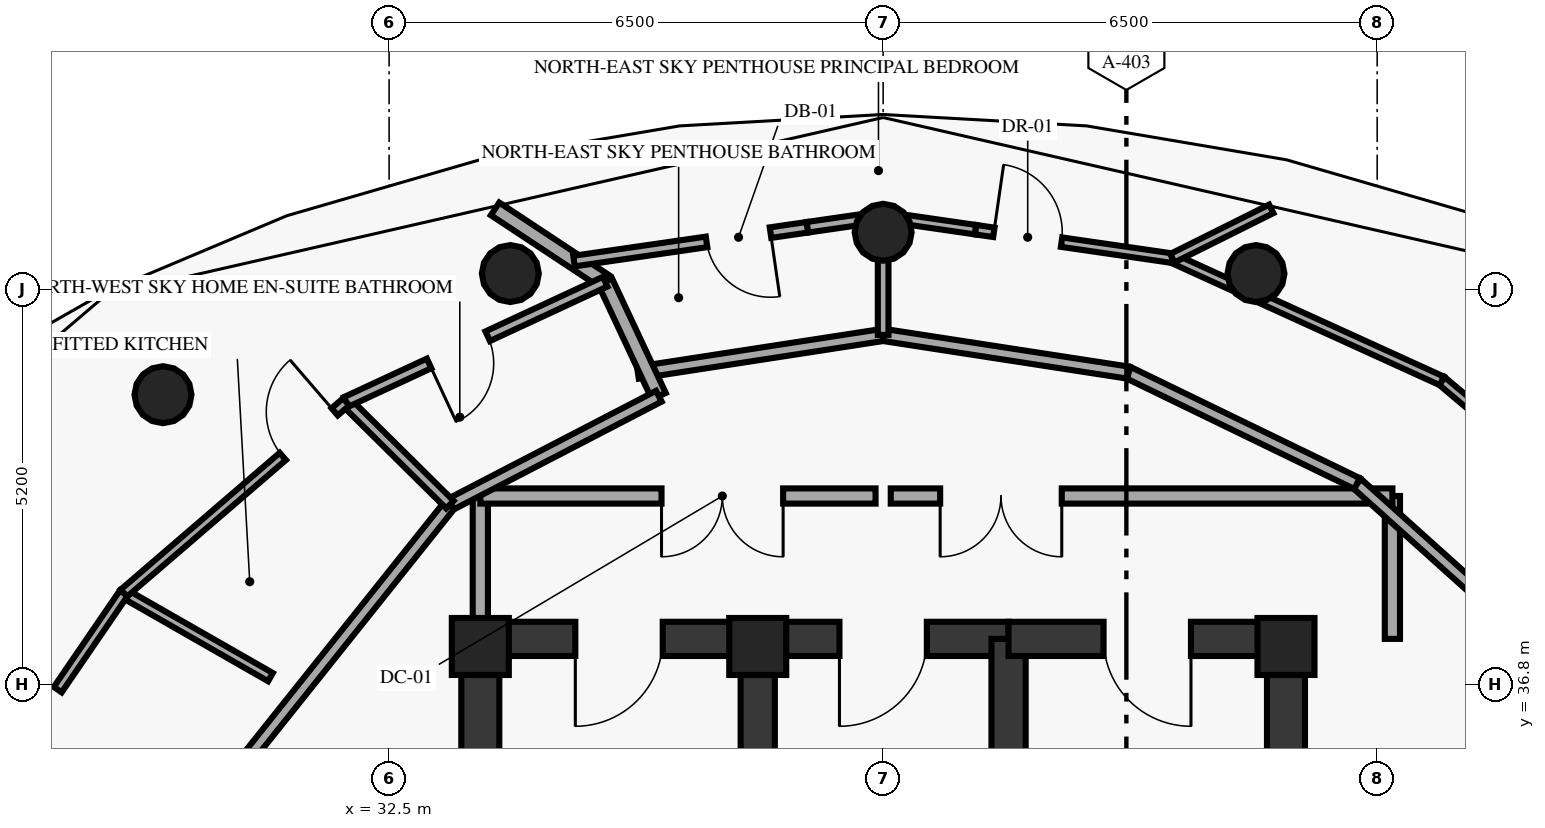
"""IFC4 building model, lengths in metres.
Left out: names, types, materials, properties, quantities, classifications, styles, units other than length and angle.
Written with IfcOpenShell. Run it as: python <this file> out.ifc"""

import sys

from ifc_helpers import new_model, si_unit, direction, frame, frame_2d, origin, origin_2d, place, context, subcontext, project, spatial, rectangle, circle, extrude, element, fill, save


model = new_model("IFC4")
c1 = context("Model", 3, precision=1e-05, world=origin(), true_north=direction((0.0, 1.0)))
c2 = subcontext(c1, "Body", "Model", "MODEL_VIEW")
j1 = project(units=[si_unit("LENGTHUNIT", "METRE"), si_unit("PLANEANGLEUNIT", "RADIAN")], contexts=[c1])
p1 = place(None, origin())
s1 = spatial("IfcSite", under=j1, at=p1, CompositionType="ELEMENT")
p2 = place(p1, origin())
s2 = spatial("IfcBuilding", under=s1, at=p2, CompositionType="ELEMENT")
p3 = place(p2, frame((0.0, 0.0, 255.6)))
s3 = spatial("IfcBuildingStorey", under=s2, at=p3, CompositionType="ELEMENT", Elevation=255.6)
for number, where, z_axis, x_axis in (
    (1, (44.3, 37.3, 0.0), (0.0, 0.0, 1.0), (1.0, 0.0, 0.0)),
    (2, (37.35, 37.3, 0.0), (0.0, 0.0, 1.0), (1.0, 0.0, 0.0)),
    (3, (33.7, 37.3, 0.0), (0.0, 0.0, 1.0), (1.0, 0.0, 0.0)),
):
    element("IfcColumn", number, at=place(p3, frame(where, z_axis=z_axis, x_axis=x_axis)), inside=s3, PredefinedType="PILASTER", context=c2, shape_type="SweptSolid", body=[
        extrude(rectangle(XDim=0.75, YDim=0.75, at=origin_2d()), origin(), (0.0, 0.0, 1.0), 3.54),
    ])
for number, where, z_axis, x_axis in (
    (4, (43.905, 42.207, 0.0), (0.0, 0.0, 1.0), (1.0, 0.0, 0.0)),
    (5, (39.0, 42.75, 0.0), (0.0, 0.0, 1.0), (1.0, 0.0, 0.0)),
    (6, (34.095, 42.207, 0.0), (0.0, 0.0, 1.0), (1.0, 0.0, 0.0)),
    (7, (29.525, 40.613, 0.0), (0.0, 0.0, 1.0), (1.0, 0.0, 0.0)),
):
    element("IfcColumn", number, at=place(p3, frame(where, z_axis=z_axis, x_axis=x_axis)), inside=s3, PredefinedType="COLUMN", context=c2, shape_type="SweptSolid", body=[
        extrude(circle(Radius=0.375, at=origin_2d()), origin(), (0.0, 0.0, 1.0), 3.54),
    ])
for number, where, z_axis, x_axis in (
    (8, (33.7, 29.05, 0.0), (0.0, 0.0, 1.0), (0.0, 1.0, 0.0)),
    (9, (44.3, 29.05, 0.0), (0.0, 0.0, 1.0), (0.0, 1.0, 0.0)),
):
    element("IfcWall", number, at=place(p3, frame(where, z_axis=z_axis, x_axis=x_axis)), inside=s3, PredefinedType="SHEAR", context=c2, shape_type="SweptSolid", body=[
        extrude(rectangle(XDim=8.35, YDim=0.5, at=frame_2d((4.175, 0.0))), origin(), (0.0, 0.0, 1.0), 3.54),
    ])
p4 = place(p3, frame((37.35, 37.4, 0.0), z_axis=(0.0, 0.0, 1.0), x_axis=(-1.0, 0.0, 0.0)))
e10 = element("IfcWall", 10, at=p4, inside=s3, PredefinedType="SHEAR", context=c2, shape_type="SweptSolid", body=[
    extrude(rectangle(XDim=3.65, YDim=0.45, at=frame_2d((1.825, 0.0))), origin(), (0.0, 0.0, 1.0), 3.54),
])
p5 = place(p4, frame((1.25, 0.0, 0.0)))
e11 = element("IfcOpeningElement", 11, at=p5, cuts=e10, PredefinedType="OPENING", context=c2, shape_type="SweptSolid", body=[
    extrude(rectangle(XDim=1.15, YDim=2.15, at=frame_2d((0.575, 1.075))), frame((0.0, 0.235, 0.0), z_axis=(0.0, -1.0, 0.0), x_axis=(1.0, 0.0, 0.0)), (0.0, 0.0, 1.0), 0.47),
])
p6 = place(p3, frame((37.35, 29.05, 0.0), z_axis=(0.0, 0.0, 1.0), x_axis=(0.0, 1.0, 0.0)))
e12 = element("IfcWall", 12, at=p6, inside=s3, PredefinedType="SHEAR", context=c2, shape_type="SweptSolid", body=[
    extrude(rectangle(XDim=8.35, YDim=0.45, at=frame_2d((4.175, 0.0))), origin(), (0.0, 0.0, 1.0), 3.54),
])
p7 = place(p3, frame((40.65, 37.4, 0.0), z_axis=(0.0, 0.0, 1.0), x_axis=(-1.0, 0.0, 0.0)))
e13 = element("IfcWall", 13, at=p7, inside=s3, PredefinedType="SHEAR", context=c2, shape_type="SweptSolid", body=[
    extrude(rectangle(XDim=3.3, YDim=0.45, at=frame_2d((1.65, 0.0))), origin(), (0.0, 0.0, 1.0), 3.54),
])
p8 = place(p7, frame((1.075, 0.0, 0.0)))
e14 = element("IfcOpeningElement", 14, at=p8, cuts=e13, PredefinedType="OPENING", context=c2, shape_type="SweptSolid", body=[
    extrude(rectangle(XDim=1.15, YDim=2.15, at=frame_2d((0.575, 1.075))), frame((0.0, 0.235, 0.0), z_axis=(0.0, -1.0, 0.0), x_axis=(1.0, 0.0, 0.0)), (0.0, 0.0, 1.0), 0.47),
])
p9 = place(p3, frame((40.65, 29.05, 0.0), z_axis=(0.0, 0.0, 1.0), x_axis=(0.0, 1.0, 0.0)))
e15 = element("IfcWall", 15, at=p9, inside=s3, PredefinedType="SHEAR", context=c2, shape_type="SweptSolid", body=[
    extrude(rectangle(XDim=8.35, YDim=0.45, at=frame_2d((4.175, 0.0))), origin(), (0.0, 0.0, 1.0), 3.54),
])
p10 = place(p3, frame((44.3, 37.4, 0.0), z_axis=(0.0, 0.0, 1.0), x_axis=(-1.0, 0.0, 0.0)))
e16 = element("IfcWall", 16, at=p10, inside=s3, PredefinedType="SHEAR", context=c2, shape_type="SweptSolid", body=[
    extrude(rectangle(XDim=3.65, YDim=0.45, at=frame_2d((1.825, 0.0))), origin(), (0.0, 0.0, 1.0), 3.54),
])
p11 = place(p10, frame((1.25, 0.0, 0.0)))
e17 = element("IfcOpeningElement", 17, at=p11, cuts=e16, PredefinedType="OPENING", context=c2, shape_type="SweptSolid", body=[
    extrude(rectangle(XDim=1.15, YDim=2.15, at=frame_2d((0.575, 1.075))), frame((0.0, 0.235, 0.0), z_axis=(0.0, -1.0, 0.0), x_axis=(1.0, 0.0, 0.0)), (0.0, 0.0, 1.0), 0.47),
])
for number, where, z_axis, x_axis in (
    (18, (33.7, 37.4, 0.0), (0.0, 0.0, 1.0), (0.0, 1.0, 0.0)),
    (19, (45.7, 37.4, 0.0), (0.0, 0.0, 1.0), (0.0, 1.0, 0.0)),
):
    element("IfcWall", number, at=place(p3, frame(where, z_axis=z_axis, x_axis=x_axis)), inside=s3, PredefinedType="SOLIDWALL", context=c2, shape_type="SweptSolid", body=[
        extrude(rectangle(XDim=1.88, YDim=0.2, at=frame_2d((0.94, 0.0))), origin(), (0.0, 0.0, 1.0), 3.54),
    ])
p12 = place(p3, frame((38.9, 39.28, 0.0), z_axis=(0.0, 0.0, 1.0), x_axis=(-1.0, 0.0, 0.0)))
e20 = element("IfcWall", 20, at=p12, inside=s3, PredefinedType="SOLIDWALL", context=c2, shape_type="SweptSolid", body=[
    extrude(rectangle(XDim=5.2, YDim=0.2, at=frame_2d((2.6, 0.0))), origin(), (0.0, 0.0, 1.0), 3.54),
])
p13 = place(p12, frame((1.216, 0.0, 0.0)))
e21 = element("IfcOpeningElement", 21, at=p13, cuts=e20, PredefinedType="OPENING", context=c2, shape_type="SweptSolid", body=[
    extrude(rectangle(XDim=1.6, YDim=2.2, at=frame_2d((0.8, 1.1))), frame((0.0, 0.11, 0.0), z_axis=(0.0, -1.0, 0.0), x_axis=(1.0, 0.0, 0.0)), (0.0, 0.0, 1.0), 0.22),
])
p14 = place(p3, frame((45.7, 39.28, 0.0), z_axis=(0.0, 0.0, 1.0), x_axis=(-1.0, 0.0, 0.0)))
e22 = element("IfcWall", 22, at=p14, inside=s3, PredefinedType="SOLIDWALL", context=c2, shape_type="SweptSolid", body=[
    extrude(rectangle(XDim=6.6, YDim=0.2, at=frame_2d((3.3, 0.0))), origin(), (0.0, 0.0, 1.0), 3.54),
])
p15 = place(p14, frame((4.35, 0.0, 0.0)))
e23 = element("IfcOpeningElement", 23, at=p15, cuts=e22, PredefinedType="OPENING", context=c2, shape_type="SweptSolid", body=[
    extrude(rectangle(XDim=1.6, YDim=2.2, at=frame_2d((0.8, 1.1))), frame((0.0, 0.11, 0.0), z_axis=(0.0, -1.0, 0.0), x_axis=(1.0, 0.0, 0.0)), (0.0, 0.0, 1.0), 0.22),
])
p16 = place(p3, frame((45.235, 39.444, 0.0), z_axis=(0.0, 0.0, 1.0), x_axis=(0.743958104357, -0.668226263299, 0.0)))
e24 = element("IfcWall", 24, at=p16, inside=s3, PredefinedType="PARTITIONING", context=c2, shape_type="SweptSolid", body=[
    extrude(rectangle(XDim=3.472, YDim=0.16, at=frame_2d((1.736, 0.0))), origin(), (0.0, 0.0, 1.0), 3.54),
])
p17 = place(p16, frame((2.272, 0.0, 0.0)))
e25 = element("IfcOpeningElement", 25, at=p17, cuts=e24, PredefinedType="OPENING", context=c2, shape_type="SweptSolid", body=[
    extrude(rectangle(XDim=1.0, YDim=2.15, at=frame_2d((0.5, 1.075))), frame((0.0, 0.09, 0.0), z_axis=(0.0, -1.0, 0.0), x_axis=(1.0, 0.0, 0.0)), (0.0, 0.0, 1.0), 0.18),
])
p18 = place(p3, frame((45.235, 39.444, 0.0), z_axis=(0.0, 0.0, 1.0), x_axis=(-0.899751550897, 0.436402505329, 0.0)))
e26 = element("IfcWall", 26, at=p18, inside=s3, PredefinedType="PARTITIONING", context=c2, shape_type="SweptSolid", body=[
    extrude(rectangle(XDim=3.343, YDim=0.16, at=frame_2d((1.672, 0.0))), origin(), (0.0, 0.0, 1.0), 3.54),
])
for number, where, z_axis, x_axis in (
    (27, (42.227, 40.903, 0.0), (0.0, 0.0, 1.0), (-0.988, 0.152, 0.0)),
    (28, (39.0, 41.4, 0.0), (0.0, 0.0, 1.0), (-0.988, -0.152, 0.0)),
):
    element("IfcWall", number, at=place(p3, frame(where, z_axis=z_axis, x_axis=x_axis)), inside=s3, PredefinedType="PARTITIONING", context=c2, shape_type="SweptSolid", body=[
        extrude(rectangle(XDim=3.265, YDim=0.16, at=frame_2d((1.633, 0.0))), origin(), (0.0, 0.0, 1.0), 3.54),
    ])
p19 = place(p3, frame((36.049, 40.593, 0.0), z_axis=(0.0, 0.0, 1.0), x_axis=(-0.424242188274, 0.905548764942, 0.0)))
e29 = element("IfcWall", 29, at=p19, inside=s3, PredefinedType="PARTITIONING", context=c2, shape_type="SweptSolid", body=[
    extrude(rectangle(XDim=1.664, YDim=0.2, at=frame_2d((0.832, 0.0))), origin(), (0.0, 0.0, 1.0), 3.54),
])
p20 = place(p3, frame((35.343, 42.1, 0.0), z_axis=(0.0, 0.0, 1.0), x_axis=(-0.834163281992, 0.551517559989, 0.0)))
e30 = element("IfcWall", 30, at=p20, inside=s3, PredefinedType="PARTITIONING", context=c2, shape_type="SweptSolid", body=[
    extrude(rectangle(XDim=1.737, YDim=0.2, at=frame_2d((0.869, 0.0))), origin(), (0.0, 0.0, 1.0), 3.54),
])
p21 = place(p3, frame((46.35, 40.795, 0.0), z_axis=(0.0, 0.0, 1.0), x_axis=(0.764348134159, -0.644803791713, 0.0)))
e31 = element("IfcWall", 31, at=p21, inside=s3, PredefinedType="PARTITIONING", context=c2, shape_type="SweptSolid", body=[
    extrude(rectangle(XDim=3.982, YDim=0.125, at=frame_2d((1.991, 0.0))), origin(), (0.0, 0.0, 1.0), 3.54),
])
p22 = place(p21, frame((2.63, 0.0, 0.0)))
e32 = element("IfcOpeningElement", 32, at=p22, cuts=e31, PredefinedType="OPENING", context=c2, shape_type="SweptSolid", body=[
    extrude(rectangle(XDim=0.9, YDim=2.1, at=frame_2d((0.45, 1.05))), frame((0.0, 0.073, 0.0), z_axis=(0.0, -1.0, 0.0), x_axis=(1.0, 0.0, 0.0)), (0.0, 0.0, 1.0), 0.145),
])
p23 = place(p3, frame((46.35, 40.795, 0.0), z_axis=(0.0, 0.0, 1.0), x_axis=(-0.910117326054, 0.414350639938, 0.0)))
e33 = element("IfcWall", 33, at=p23, inside=s3, PredefinedType="PARTITIONING", context=c2, shape_type="SweptSolid", body=[
    extrude(rectangle(XDim=3.895, YDim=0.125, at=frame_2d((1.948, 0.0))), origin(), (0.0, 0.0, 1.0), 3.54),
])
p24 = place(p3, frame((39.0, 42.96, 0.0), z_axis=(0.0, 0.0, 1.0), x_axis=(0.989701809114, -0.143144434177, 0.0)))
e34 = element("IfcWall", 34, at=p24, inside=s3, PredefinedType="PARTITIONING", context=c2, shape_type="SweptSolid", body=[
    extrude(rectangle(XDim=1.23, YDim=0.125, at=frame_2d((0.615, 0.0))), origin(), (0.0, 0.0, 1.0), 3.54),
])
p25 = place(p3, frame((40.217, 42.784, 0.0), z_axis=(0.0, 0.0, 1.0), x_axis=(0.989663671869, -0.143407867924, 0.0)))
e35 = element("IfcWall", 35, at=p25, inside=s3, PredefinedType="PARTITIONING", context=c2, shape_type="SweptSolid", body=[
    extrude(rectangle(XDim=2.615, YDim=0.125, at=frame_2d((1.308, 0.0))), origin(), (0.0, 0.0, 1.0), 3.0),
])
p26 = place(p25, frame((0.242, 0.0, 0.0)))
e36 = element("IfcOpeningElement", 36, at=p26, cuts=e35, PredefinedType="OPENING", context=c2, shape_type="SweptSolid", body=[
    extrude(rectangle(XDim=0.9, YDim=2.1, at=frame_2d((0.45, 1.05))), frame((0.0, 0.073, 0.0), z_axis=(0.0, -1.0, 0.0), x_axis=(1.0, 0.0, 0.0)), (0.0, 0.0, 1.0), 0.145),
])
p27 = place(p3, frame((34.933, 42.371, 0.0), z_axis=(0.0, 0.0, 1.0), x_axis=(0.98967063222, 0.143359826038, 0.0)))
e37 = element("IfcWall", 37, at=p27, inside=s3, PredefinedType="PARTITIONING", context=c2, shape_type="SweptSolid", body=[
    extrude(rectangle(XDim=3.103, YDim=0.14, at=frame_2d((1.551, 0.0))), origin(), (0.0, 0.0, 1.0), 3.0),
])
p28 = place(p27, frame((1.762, 0.0, 0.0)))
e38 = element("IfcOpeningElement", 38, at=p28, cuts=e37, PredefinedType="OPENING", context=c2, shape_type="SweptSolid", body=[
    extrude(rectangle(XDim=0.85, YDim=2.1, at=frame_2d((0.425, 1.05))), frame((0.0, 0.08, 0.0), z_axis=(0.0, -1.0, 0.0), x_axis=(1.0, 0.0, 0.0)), (0.0, 0.0, 1.0), 0.16),
])
p29 = place(p3, frame((38.004, 42.816, 0.0), z_axis=(0.0, 0.0, 1.0), x_axis=(0.989705462513, 0.143119172275, 0.0)))
e39 = element("IfcWall", 39, at=p29, inside=s3, PredefinedType="PARTITIONING", context=c2, shape_type="SweptSolid", body=[
    extrude(rectangle(XDim=1.006, YDim=0.14, at=frame_2d((0.503, 0.0))), origin(), (0.0, 0.0, 1.0), 3.54),
])
p30 = place(p3, frame((39.0, 41.4, 0.0), z_axis=(0.0, 0.0, 1.0), x_axis=(0.0, 1.0, 0.0)))
e40 = element("IfcWall", 40, at=p30, inside=s3, PredefinedType="PARTITIONING", context=c2, shape_type="SweptSolid", body=[
    extrude(rectangle(XDim=1.56, YDim=0.14, at=frame_2d((0.78, 0.0))), origin(), (0.0, 0.0, 1.0), 3.54),
])
p31 = place(p3, frame((42.805, 42.409, 0.0), z_axis=(0.0, 0.0, 1.0), x_axis=(0.894796289478, 0.446474635714, 0.0)))
e41 = element("IfcWall", 41, at=p31, inside=s3, PredefinedType="PARTITIONING", context=c2, shape_type="SweptSolid", body=[
    extrude(rectangle(XDim=1.454, YDim=0.125, at=frame_2d((0.727, 0.0))), origin(), (0.0, 0.0, 1.0), 3.54),
])
p32 = place(p3, frame((36.049, 40.593, 0.0), z_axis=(0.0, 0.0, 1.0), x_axis=(-0.887674575788, -0.460471331898, 0.0)))
e42 = element("IfcWall", 42, at=p32, inside=s3, PredefinedType="PARTITIONING", context=c2, shape_type="SweptSolid", body=[
    extrude(rectangle(XDim=3.097, YDim=0.16, at=frame_2d((1.548, 0.0))), origin(), (0.0, 0.0, 1.0), 3.54),
])
p33 = place(p3, frame((33.3, 39.167, 0.0), z_axis=(0.0, 0.0, 1.0), x_axis=(-0.623915746766, -0.781491612839, 0.0)))
e43 = element("IfcWall", 43, at=p33, inside=s3, PredefinedType="PARTITIONING", context=c2, shape_type="SweptSolid", body=[
    extrude(rectangle(XDim=6.688, YDim=0.16, at=frame_2d((3.344, 0.0))), origin(), (0.0, 0.0, 1.0), 3.54),
])
p34 = place(p3, frame((33.3, 39.167, 0.0), z_axis=(0.0, 0.0, 1.0), x_axis=(-0.710720381731, 0.703474618584, 0.0)))
e44 = element("IfcWall", 44, at=p34, inside=s3, PredefinedType="PARTITIONING", context=c2, shape_type="SweptSolid", body=[
    extrude(rectangle(XDim=1.921, YDim=0.14, at=frame_2d((0.96, 0.0))), origin(), (0.0, 0.0, 1.0), 3.54),
])
p35 = place(p3, frame((30.939, 36.897, 0.0), z_axis=(0.0, 0.0, 1.0), x_axis=(-0.868013301924, 0.496540942606, 0.0)))
e45 = element("IfcWall", 45, at=p35, inside=s3, PredefinedType="PARTITIONING", context=c2, shape_type="SweptSolid", body=[
    extrude(rectangle(XDim=2.223, YDim=0.125, at=frame_2d((1.112, 0.0))), origin(), (0.0, 0.0, 1.0), 3.54),
])
p36 = place(p3, frame((31.935, 40.518, 0.0), z_axis=(0.0, 0.0, 1.0), x_axis=(0.907032898502, 0.421059759459, 0.0)))
e46 = element("IfcWall", 46, at=p36, inside=s3, PredefinedType="PARTITIONING", context=c2, shape_type="SweptSolid", body=[
    extrude(rectangle(XDim=3.757, YDim=0.14, at=frame_2d((1.879, 0.0))), origin(), (0.0, 0.0, 1.0), 3.54),
])
p37 = place(p36, frame((1.203, 0.0, 0.0)))
e47 = element("IfcOpeningElement", 47, at=p37, cuts=e46, PredefinedType="OPENING", context=c2, shape_type="SweptSolid", body=[
    extrude(rectangle(XDim=0.85, YDim=2.1, at=frame_2d((0.425, 1.05))), frame((0.0, 0.08, 0.0), z_axis=(0.0, -1.0, 0.0), x_axis=(1.0, 0.0, 0.0)), (0.0, 0.0, 1.0), 0.16),
])
p38 = place(p3, frame((29.009, 38.001, 0.0), z_axis=(0.0, 0.0, 1.0), x_axis=(0.758094504626, 0.652144709444, 0.0)))
e48 = element("IfcWall", 48, at=p38, inside=s3, PredefinedType="PARTITIONING", context=c2, shape_type="SweptSolid", body=[
    extrude(rectangle(XDim=3.86, YDim=0.125, at=frame_2d((1.93, 0.0))), origin(), (0.0, 0.0, 1.0), 3.54),
])
p39 = place(p38, frame((2.76, 0.0, 0.0)))
e49 = element("IfcOpeningElement", 49, at=p39, cuts=e48, PredefinedType="OPENING", context=c2, shape_type="SweptSolid", body=[
    extrude(rectangle(XDim=0.9, YDim=2.1, at=frame_2d((0.45, 1.05))), frame((0.0, 0.073, 0.0), z_axis=(0.0, -1.0, 0.0), x_axis=(1.0, 0.0, 0.0)), (0.0, 0.0, 1.0), 0.145),
])
p40 = place(p3, frame((26.763, 34.72, 0.0), z_axis=(0.0, 0.0, 1.0), x_axis=(0.564888606623, 0.825167172219, 0.0)))
e50 = element("IfcWall", 50, at=p40, inside=s3, PredefinedType="PARTITIONING", context=c2, shape_type="SweptSolid", body=[
    extrude(rectangle(XDim=3.976, YDim=0.125, at=frame_2d((1.988, 0.0))), origin(), (0.0, 0.0, 1.0), 3.54),
])
p41 = place(p40, frame((1.538, 0.0, 0.0)))
e51 = element("IfcOpeningElement", 51, at=p41, cuts=e50, PredefinedType="OPENING", context=c2, shape_type="SweptSolid", body=[
    extrude(rectangle(XDim=0.9, YDim=2.1, at=frame_2d((0.45, 1.05))), frame((0.0, 0.073, 0.0), z_axis=(0.0, -1.0, 0.0), x_axis=(1.0, 0.0, 0.0)), (0.0, 0.0, 1.0), 0.145),
])
p42 = place(p5, origin())
e52 = element("IfcDoor", 52, at=p42, inside=s3, OperationType="SINGLE_SWING_RIGHT", PredefinedType="DOOR", context=c2, shape_type="SweptSolid", body=[
    extrude(rectangle(XDim=1.15, YDim=2.15, at=frame_2d((0.575, 1.075))), frame((0.0, 0.025, 0.0), z_axis=(0.0, -1.0, 0.0), x_axis=(1.0, 0.0, 0.0)), (0.0, 0.0, 1.0), 0.05),
])
fill(e11, e52)
p43 = place(p8, origin())
e53 = element("IfcDoor", 53, at=p43, inside=s3, OperationType="SINGLE_SWING_RIGHT", PredefinedType="DOOR", context=c2, shape_type="SweptSolid", body=[
    extrude(rectangle(XDim=1.15, YDim=2.15, at=frame_2d((0.575, 1.075))), frame((0.0, 0.025, 0.0), z_axis=(0.0, -1.0, 0.0), x_axis=(1.0, 0.0, 0.0)), (0.0, 0.0, 1.0), 0.05),
])
fill(e14, e53)
p44 = place(p11, origin())
e54 = element("IfcDoor", 54, at=p44, inside=s3, OperationType="SINGLE_SWING_LEFT", PredefinedType="DOOR", context=c2, shape_type="SweptSolid", body=[
    extrude(rectangle(XDim=1.15, YDim=2.15, at=frame_2d((0.575, 1.075))), frame((0.0, 0.025, 0.0), z_axis=(0.0, -1.0, 0.0), x_axis=(1.0, 0.0, 0.0)), (0.0, 0.0, 1.0), 0.05),
])
fill(e17, e54)
p45 = place(p13, origin())
e55 = element("IfcDoor", 55, at=p45, inside=s3, OperationType="DOUBLE_DOOR_SINGLE_SWING", PredefinedType="DOOR", context=c2, shape_type="SweptSolid", body=[
    extrude(rectangle(XDim=1.6, YDim=2.2, at=frame_2d((0.8, 1.1))), frame((0.0, 0.025, 0.0), z_axis=(0.0, -1.0, 0.0), x_axis=(1.0, 0.0, 0.0)), (0.0, 0.0, 1.0), 0.05),
])
fill(e21, e55)
p46 = place(p15, origin())
e56 = element("IfcDoor", 56, at=p46, inside=s3, OperationType="DOUBLE_DOOR_SINGLE_SWING", PredefinedType="DOOR", context=c2, shape_type="SweptSolid", body=[
    extrude(rectangle(XDim=1.6, YDim=2.2, at=frame_2d((0.8, 1.1))), frame((0.0, 0.025, 0.0), z_axis=(0.0, -1.0, 0.0), x_axis=(1.0, 0.0, 0.0)), (0.0, 0.0, 1.0), 0.05),
])
fill(e23, e56)
p47 = place(p26, origin())
e57 = element("IfcDoor", 57, at=p47, inside=s3, OperationType="SINGLE_SWING_LEFT", PredefinedType="DOOR", context=c2, shape_type="SweptSolid", body=[
    extrude(rectangle(XDim=0.9, YDim=2.1, at=frame_2d((0.45, 1.05))), frame((0.0, 0.025, 0.0), z_axis=(0.0, -1.0, 0.0), x_axis=(1.0, 0.0, 0.0)), (0.0, 0.0, 1.0), 0.05),
])
fill(e36, e57)
p48 = place(p28, origin())
e58 = element("IfcDoor", 58, at=p48, inside=s3, OperationType="SINGLE_SWING_RIGHT", PredefinedType="DOOR", context=c2, shape_type="SweptSolid", body=[
    extrude(rectangle(XDim=0.85, YDim=2.1, at=frame_2d((0.425, 1.05))), frame((0.0, 0.025, 0.0), z_axis=(0.0, -1.0, 0.0), x_axis=(1.0, 0.0, 0.0)), (0.0, 0.0, 1.0), 0.05),
])
fill(e38, e58)
p49 = place(p37, origin())
e59 = element("IfcDoor", 59, at=p49, inside=s3, OperationType="SINGLE_SWING_LEFT", PredefinedType="DOOR", context=c2, shape_type="SweptSolid", body=[
    extrude(rectangle(XDim=0.85, YDim=2.1, at=frame_2d((0.425, 1.05))), frame((0.0, 0.025, 0.0), z_axis=(0.0, -1.0, 0.0), x_axis=(1.0, 0.0, 0.0)), (0.0, 0.0, 1.0), 0.05),
])
fill(e47, e59)
p50 = place(p39, origin())
e60 = element("IfcDoor", 60, at=p50, inside=s3, OperationType="SINGLE_SWING_RIGHT", PredefinedType="DOOR", context=c2, shape_type="SweptSolid", body=[
    extrude(rectangle(XDim=0.9, YDim=2.1, at=frame_2d((0.45, 1.05))), frame((0.0, 0.025, 0.0), z_axis=(0.0, -1.0, 0.0), x_axis=(1.0, 0.0, 0.0)), (0.0, 0.0, 1.0), 0.05),
])
fill(e49, e60)
p51 = place(p41, origin())
e61 = element("IfcDoor", 61, at=p51, inside=s3, OperationType="SINGLE_SWING_LEFT", PredefinedType="DOOR", context=c2, shape_type="SweptSolid", body=[
    extrude(rectangle(XDim=0.9, YDim=2.1, at=frame_2d((0.45, 1.05))), frame((0.0, 0.025, 0.0), z_axis=(0.0, -1.0, 0.0), x_axis=(1.0, 0.0, 0.0)), (0.0, 0.0, 1.0), 0.05),
])
fill(e51, e61)
save(model, sys.argv[1])
